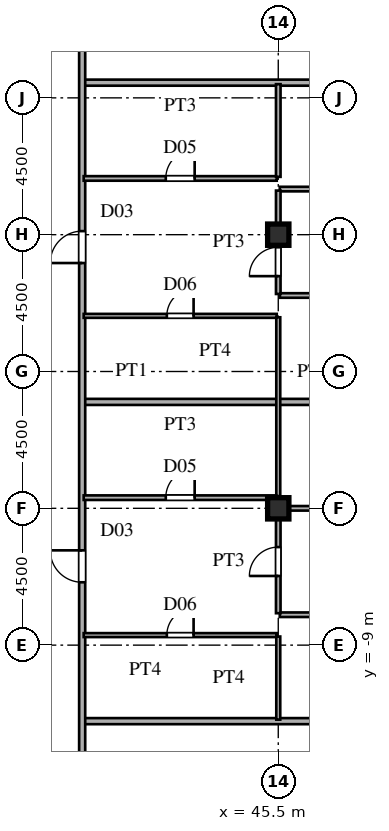
"""IFC4 building model, lengths in metres.
Left out: names, types, materials, properties, quantities, classifications, styles, units other than length and angle.
Written with IfcOpenShell. Run it as: python <this file> out.ifc"""

import sys

from ifc_helpers import new_model, si_unit, direction, frame, frame_2d, origin, origin_2d, place, context, subcontext, project, spatial, rectangle, i_section, extrude, source, transform, mapped, element, fill, save


model = new_model("IFC4")
c1 = context("Model", 3, precision=1e-05, world=origin(), true_north=direction((0.0, 1.0)))
c2 = subcontext(c1, "Body", "Model", "MODEL_VIEW")
j1 = project(units=[si_unit("LENGTHUNIT", "METRE"), si_unit("PLANEANGLEUNIT", "RADIAN")], contexts=[c1])
p1 = place(None, origin())
s1 = spatial("IfcSite", under=j1, at=p1, CompositionType="ELEMENT")
p2 = place(p1, origin())
s2 = spatial("IfcBuilding", under=s1, at=p2, CompositionType="ELEMENT")
p3 = place(p2, frame((0.0, 0.0, 147.6)))
s3 = spatial("IfcBuildingStorey", under=s2, at=p3, CompositionType="ELEMENT", Elevation=147.6)
m1 = source(origin(), c2, "Body", "SweptSolid", [
    extrude(i_section(OverallWidth=0.7, OverallDepth=0.7, WebThickness=0.028, FlangeThickness=0.045, at=origin_2d()), origin(), (0.0, 0.0, 1.0), 3.6),
])
for number, where, z_axis, x_axis in (
    (1, (45.5, -4.5, 0.0), (0.0, 0.0, 1.0), (1.0, 0.0, 0.0)),
    (2, (45.5, 4.5, 0.0), (0.0, 0.0, 1.0), (1.0, 0.0, 0.0)),
):
    element("IfcColumn", number, at=place(p3, frame(where, z_axis=z_axis, x_axis=x_axis)), inside=s3, PredefinedType="COLUMN", context=c2, shape_type="MappedRepresentation", body=[
        mapped(m1, transform((0.0, 0.0, 0.0), scale=1.0)),
    ])
p4 = place(p3, frame((39.13, -11.5, 0.0), z_axis=(0.0, 0.0, 1.0), x_axis=(1.0, 0.0, 0.0)))
e3 = element("IfcWall", 3, at=p4, inside=s3, PredefinedType="PARTITIONING", context=c2, shape_type="SweptSolid", body=[
    extrude(rectangle(XDim=17.714, YDim=0.2, at=frame_2d((8.857, 0.0))), origin(), (0.0, 0.0, 1.0), 3.38),
])
p5 = place(p3, frame((39.1, -8.67, 0.0), z_axis=(0.0, 0.0, 1.0), x_axis=(1.0, 0.0, 0.0)))
e4 = element("IfcWall", 4, at=p5, inside=s3, PredefinedType="PARTITIONING", context=c2, shape_type="SweptSolid", body=[
    extrude(rectangle(XDim=6.35, YDim=0.13, at=frame_2d((3.175, 0.0))), origin(), (0.0, 0.0, 1.0), 3.38),
])
p6 = place(p5, frame((2.735, 0.0, 0.0)))
e5 = element("IfcOpeningElement", 5, at=p6, cuts=e4, PredefinedType="OPENING", context=c2, shape_type="SweptSolid", body=[
    extrude(rectangle(XDim=0.88, YDim=2.1, at=frame_2d((0.44, 1.05))), frame((0.0, 0.075, 0.0), z_axis=(0.0, -1.0, 0.0), x_axis=(1.0, 0.0, 0.0)), (0.0, 0.0, 1.0), 0.15),
])
p7 = place(p3, frame((45.55, -8.0, 0.0), z_axis=(0.0, 0.0, 1.0), x_axis=(1.0, 0.0, 0.0)))
e6 = element("IfcWall", 6, at=p7, inside=s3, PredefinedType="PARTITIONING", context=c2, shape_type="SweptSolid", body=[
    extrude(rectangle(XDim=18.139, YDim=0.15, at=frame_2d((9.069, 0.0))), origin(), (0.0, 0.0, 1.0), 3.38),
])
p8 = place(p7, frame((3.975, 0.0, 0.0)))
e7 = element("IfcOpeningElement", 7, at=p8, cuts=e6, PredefinedType="OPENING", context=c2, shape_type="SweptSolid", body=[
    extrude(rectangle(XDim=0.95, YDim=2.15, at=frame_2d((0.475, 1.075))), frame((0.0, 0.085, 0.0), z_axis=(0.0, -1.0, 0.0), x_axis=(1.0, 0.0, 0.0)), (0.0, 0.0, 1.0), 0.17),
])
p9 = place(p3, frame((45.55, -4.5, 0.0), z_axis=(0.0, 0.0, 1.0), x_axis=(1.0, 0.0, 0.0)))
e8 = element("IfcWall", 8, at=p9, inside=s3, PredefinedType="PARTITIONING", context=c2, shape_type="SweptSolid", body=[
    extrude(rectangle(XDim=23.825, YDim=0.15, at=frame_2d((11.913, 0.0))), origin(), (0.0, 0.0, 1.0), 2.78),
])
p10 = place(p9, frame((3.975, 0.0, 0.0)))
e9 = element("IfcOpeningElement", 9, at=p10, cuts=e8, PredefinedType="OPENING", context=c2, shape_type="SweptSolid", body=[
    extrude(rectangle(XDim=0.95, YDim=2.15, at=frame_2d((0.475, 1.075))), frame((0.0, 0.085, 0.0), z_axis=(0.0, -1.0, 0.0), x_axis=(1.0, 0.0, 0.0)), (0.0, 0.0, 1.0), 0.17),
])
p11 = place(p3, frame((39.1, -4.15, 0.0), z_axis=(0.0, 0.0, 1.0), x_axis=(1.0, 0.0, 0.0)))
e10 = element("IfcWall", 10, at=p11, inside=s3, PredefinedType="PARTITIONING", context=c2, shape_type="SweptSolid", body=[
    extrude(rectangle(XDim=6.35, YDim=0.15, at=frame_2d((3.175, 0.0))), origin(), (0.0, 0.0, 1.0), 3.38),
])
p12 = place(p11, frame((2.7, 0.0, 0.0)))
e11 = element("IfcOpeningElement", 11, at=p12, cuts=e10, PredefinedType="OPENING", context=c2, shape_type="SweptSolid", body=[
    extrude(rectangle(XDim=0.95, YDim=2.15, at=frame_2d((0.475, 1.075))), frame((0.0, 0.085, 0.0), z_axis=(0.0, -1.0, 0.0), x_axis=(1.0, 0.0, 0.0)), (0.0, 0.0, 1.0), 0.17),
])
p13 = place(p3, frame((39.13, -1.0, 0.0), z_axis=(0.0, 0.0, 1.0), x_axis=(1.0, 0.0, 0.0)))
e12 = element("IfcWall", 12, at=p13, inside=s3, PredefinedType="PARTITIONING", context=c2, shape_type="SweptSolid", body=[
    extrude(rectangle(XDim=30.375, YDim=0.2, at=frame_2d((15.188, 0.0))), origin(), (0.0, 0.0, 1.0), 3.38),
])
p14 = place(p3, frame((39.1, 1.83, 0.0), z_axis=(0.0, 0.0, 1.0), x_axis=(1.0, 0.0, 0.0)))
e13 = element("IfcWall", 13, at=p14, inside=s3, PredefinedType="PARTITIONING", context=c2, shape_type="SweptSolid", body=[
    extrude(rectangle(XDim=6.35, YDim=0.13, at=frame_2d((3.175, 0.0))), origin(), (0.0, 0.0, 1.0), 3.38),
])
p15 = place(p14, frame((2.735, 0.0, 0.0)))
e14 = element("IfcOpeningElement", 14, at=p15, cuts=e13, PredefinedType="OPENING", context=c2, shape_type="SweptSolid", body=[
    extrude(rectangle(XDim=0.88, YDim=2.1, at=frame_2d((0.44, 1.05))), frame((0.0, 0.075, 0.0), z_axis=(0.0, -1.0, 0.0), x_axis=(1.0, 0.0, 0.0)), (0.0, 0.0, 1.0), 0.15),
])
p16 = place(p3, frame((45.55, 2.5, 0.0), z_axis=(0.0, 0.0, 1.0), x_axis=(1.0, 0.0, 0.0)))
e15 = element("IfcWall", 15, at=p16, inside=s3, PredefinedType="PARTITIONING", context=c2, shape_type="SweptSolid", body=[
    extrude(rectangle(XDim=23.985, YDim=0.15, at=frame_2d((11.992, 0.0))), origin(), (0.0, 0.0, 1.0), 3.38),
])
p17 = place(p16, frame((3.975, 0.0, 0.0)))
e16 = element("IfcOpeningElement", 16, at=p17, cuts=e15, PredefinedType="OPENING", context=c2, shape_type="SweptSolid", body=[
    extrude(rectangle(XDim=0.95, YDim=2.15, at=frame_2d((0.475, 1.075))), frame((0.0, 0.085, 0.0), z_axis=(0.0, -1.0, 0.0), x_axis=(1.0, 0.0, 0.0)), (0.0, 0.0, 1.0), 0.17),
])
p18 = place(p16, frame((15.975, 0.0, 0.0)))
e17 = element("IfcOpeningElement", 17, at=p18, cuts=e15, PredefinedType="OPENING", context=c2, shape_type="SweptSolid", body=[
    extrude(rectangle(XDim=0.95, YDim=2.15, at=frame_2d((0.475, 1.075))), frame((0.0, 0.085, 0.0), z_axis=(0.0, -1.0, 0.0), x_axis=(1.0, 0.0, 0.0)), (0.0, 0.0, 1.0), 0.17),
])
p19 = place(p3, frame((45.55, 6.0, 0.0), z_axis=(0.0, 0.0, 1.0), x_axis=(1.0, 0.0, 0.0)))
e18 = element("IfcWall", 18, at=p19, inside=s3, PredefinedType="PARTITIONING", context=c2, shape_type="SweptSolid", body=[
    extrude(rectangle(XDim=22.036, YDim=0.15, at=frame_2d((11.018, 0.0))), origin(), (0.0, 0.0, 1.0), 3.38),
])
p20 = place(p19, frame((3.975, 0.0, 0.0)))
e19 = element("IfcOpeningElement", 19, at=p20, cuts=e18, PredefinedType="OPENING", context=c2, shape_type="SweptSolid", body=[
    extrude(rectangle(XDim=0.95, YDim=2.15, at=frame_2d((0.475, 1.075))), frame((0.0, 0.085, 0.0), z_axis=(0.0, -1.0, 0.0), x_axis=(1.0, 0.0, 0.0)), (0.0, 0.0, 1.0), 0.17),
])
p21 = place(p19, frame((15.001, 0.0, 0.0)))
e20 = element("IfcOpeningElement", 20, at=p21, cuts=e18, PredefinedType="OPENING", context=c2, shape_type="SweptSolid", body=[
    extrude(rectangle(XDim=0.95, YDim=2.15, at=frame_2d((0.475, 1.075))), frame((0.0, 0.085, 0.0), z_axis=(0.0, -1.0, 0.0), x_axis=(1.0, 0.0, 0.0)), (0.0, 0.0, 1.0), 0.17),
])
p22 = place(p3, frame((39.1, 6.35, 0.0), z_axis=(0.0, 0.0, 1.0), x_axis=(1.0, 0.0, 0.0)))
e21 = element("IfcWall", 21, at=p22, inside=s3, PredefinedType="PARTITIONING", context=c2, shape_type="SweptSolid", body=[
    extrude(rectangle(XDim=6.35, YDim=0.15, at=frame_2d((3.175, 0.0))), origin(), (0.0, 0.0, 1.0), 3.38),
])
p23 = place(p22, frame((2.7, 0.0, 0.0)))
e22 = element("IfcOpeningElement", 22, at=p23, cuts=e21, PredefinedType="OPENING", context=c2, shape_type="SweptSolid", body=[
    extrude(rectangle(XDim=0.95, YDim=2.15, at=frame_2d((0.475, 1.075))), frame((0.0, 0.085, 0.0), z_axis=(0.0, -1.0, 0.0), x_axis=(1.0, 0.0, 0.0)), (0.0, 0.0, 1.0), 0.17),
])
p24 = place(p3, frame((39.13, 9.5, 0.0), z_axis=(0.0, 0.0, 1.0), x_axis=(1.0, 0.0, 0.0)))
e23 = element("IfcWall", 23, at=p24, inside=s3, PredefinedType="PARTITIONING", context=c2, shape_type="SweptSolid", body=[
    extrude(rectangle(XDim=21.612, YDim=0.2, at=frame_2d((10.806, 0.0))), origin(), (0.0, 0.0, 1.0), 3.38),
])
p25 = place(p3, frame((39.05, -15.715, 0.0), z_axis=(0.0, 0.0, 1.0), x_axis=(0.0, 1.0, 0.0)))
e24 = element("IfcWall", 24, at=p25, inside=s3, PredefinedType="PARTITIONING", context=c2, shape_type="SweptSolid", body=[
    extrude(rectangle(XDim=31.43, YDim=0.2, at=frame_2d((15.715, 0.0))), origin(), (0.0, 0.0, 1.0), 3.38),
])
p26 = place(p25, frame((1.54, 0.0, 0.0)))
e25 = element("IfcOpeningElement", 25, at=p26, cuts=e24, PredefinedType="OPENING", context=c2, shape_type="SweptSolid", body=[
    extrude(rectangle(XDim=1.05, YDim=2.25, at=frame_2d((0.525, 1.125))), frame((0.0, 0.11, 0.0), z_axis=(0.0, -1.0, 0.0), x_axis=(1.0, 0.0, 0.0)), (0.0, 0.0, 1.0), 0.22),
])
p27 = place(p25, frame((8.782, 0.0, 0.0)))
e26 = element("IfcOpeningElement", 26, at=p27, cuts=e24, PredefinedType="OPENING", context=c2, shape_type="SweptSolid", body=[
    extrude(rectangle(XDim=1.05, YDim=2.25, at=frame_2d((0.525, 1.125))), frame((0.0, 0.11, 0.0), z_axis=(0.0, -1.0, 0.0), x_axis=(1.0, 0.0, 0.0)), (0.0, 0.0, 1.0), 0.22),
])
p28 = place(p25, frame((19.282, 0.0, 0.0)))
e27 = element("IfcOpeningElement", 27, at=p28, cuts=e24, PredefinedType="OPENING", context=c2, shape_type="SweptSolid", body=[
    extrude(rectangle(XDim=1.05, YDim=2.25, at=frame_2d((0.525, 1.125))), frame((0.0, 0.11, 0.0), z_axis=(0.0, -1.0, 0.0), x_axis=(1.0, 0.0, 0.0)), (0.0, 0.0, 1.0), 0.22),
])
p29 = place(p25, frame((27.84, 0.0, 0.0)))
e28 = element("IfcOpeningElement", 28, at=p29, cuts=e24, PredefinedType="OPENING", context=c2, shape_type="SweptSolid", body=[
    extrude(rectangle(XDim=1.05, YDim=2.25, at=frame_2d((0.525, 1.125))), frame((0.0, 0.11, 0.0), z_axis=(0.0, -1.0, 0.0), x_axis=(1.0, 0.0, 0.0)), (0.0, 0.0, 1.0), 0.22),
])
p30 = place(p3, frame((45.5, -11.45, 0.0), z_axis=(0.0, 0.0, 1.0), x_axis=(0.0, 1.0, 0.0)))
e29 = element("IfcWall", 29, at=p30, inside=s3, PredefinedType="PARTITIONING", context=c2, shape_type="SweptSolid", body=[
    extrude(rectangle(XDim=2.733, YDim=0.13, at=frame_2d((1.366, 0.0))), origin(), (0.0, 0.0, 1.0), 2.78),
])
p31 = place(p3, frame((45.5, -7.95, 0.0), z_axis=(0.0, 0.0, 1.0), x_axis=(0.0, 1.0, 0.0)))
e30 = element("IfcWall", 30, at=p31, inside=s3, PredefinedType="PARTITIONING", context=c2, shape_type="SweptSolid", body=[
    extrude(rectangle(XDim=3.4, YDim=0.15, at=frame_2d((1.7, 0.0))), origin(), (0.0, 0.0, 1.0), 2.78),
])
p32 = place(p31, frame((1.225, 0.0, 0.0)))
e31 = element("IfcOpeningElement", 31, at=p32, cuts=e30, PredefinedType="OPENING", context=c2, shape_type="SweptSolid", body=[
    extrude(rectangle(XDim=0.95, YDim=2.15, at=frame_2d((0.475, 1.075))), frame((0.0, 0.085, 0.0), z_axis=(0.0, -1.0, 0.0), x_axis=(1.0, 0.0, 0.0)), (0.0, 0.0, 1.0), 0.17),
])
p33 = place(p3, frame((45.5, -4.098, 0.0), z_axis=(0.0, 0.0, 1.0), x_axis=(0.0, 1.0, 0.0)))
e32 = element("IfcWall", 32, at=p33, inside=s3, PredefinedType="PARTITIONING", context=c2, shape_type="SweptSolid", body=[
    extrude(rectangle(XDim=5.881, YDim=0.13, at=frame_2d((2.94, 0.0))), origin(), (0.0, 0.0, 1.0), 2.78),
])
p34 = place(p3, frame((45.5, 2.55, 0.0), z_axis=(0.0, 0.0, 1.0), x_axis=(0.0, 1.0, 0.0)))
e33 = element("IfcWall", 33, at=p34, inside=s3, PredefinedType="PARTITIONING", context=c2, shape_type="SweptSolid", body=[
    extrude(rectangle(XDim=3.4, YDim=0.15, at=frame_2d((1.7, 0.0))), origin(), (0.0, 0.0, 1.0), 2.78),
])
p35 = place(p34, frame((0.586, 0.0, 0.0)))
e34 = element("IfcOpeningElement", 34, at=p35, cuts=e33, PredefinedType="OPENING", context=c2, shape_type="SweptSolid", body=[
    extrude(rectangle(XDim=0.95, YDim=2.15, at=frame_2d((0.475, 1.075))), frame((0.0, 0.085, 0.0), z_axis=(0.0, -1.0, 0.0), x_axis=(1.0, 0.0, 0.0)), (0.0, 0.0, 1.0), 0.17),
])
p36 = place(p3, frame((45.5, 6.402, 0.0), z_axis=(0.0, 0.0, 1.0), x_axis=(0.0, 1.0, 0.0)))
e35 = element("IfcWall", 35, at=p36, inside=s3, PredefinedType="PARTITIONING", context=c2, shape_type="SweptSolid", body=[
    extrude(rectangle(XDim=3.048, YDim=0.15, at=frame_2d((1.524, 0.0))), origin(), (0.0, 0.0, 1.0), 2.78),
])
m2 = source(origin(), c2, "Body", "SweptSolid", [
    extrude(rectangle(XDim=0.88, YDim=2.1, at=frame_2d((0.44, 1.05))), frame((0.0, 0.025, 0.0), z_axis=(0.0, -1.0, 0.0), x_axis=(1.0, 0.0, 0.0)), (0.0, 0.0, 1.0), 0.05),
])
p37 = place(p6, origin())
e36 = element("IfcDoor", 36, at=p37, inside=s3, OperationType="SINGLE_SWING_RIGHT", PredefinedType="DOOR", context=c2, shape_type="MappedRepresentation", body=[
    mapped(m2, transform((0.0, 0.0, 0.0), scale=1.0)),
])
fill(e5, e36)
m3 = source(origin(), c2, "Body", "SweptSolid", [
    extrude(rectangle(XDim=0.95, YDim=2.15, at=frame_2d((0.475, 1.075))), frame((0.0, 0.025, 0.0), z_axis=(0.0, -1.0, 0.0), x_axis=(1.0, 0.0, 0.0)), (0.0, 0.0, 1.0), 0.05),
])
p38 = place(p12, origin())
e37 = element("IfcDoor", 37, at=p38, inside=s3, OperationType="SINGLE_SWING_RIGHT", PredefinedType="DOOR", context=c2, shape_type="MappedRepresentation", body=[
    mapped(m3, transform((0.0, 0.0, 0.0), scale=1.0)),
])
fill(e11, e37)
p39 = place(p15, origin())
e38 = element("IfcDoor", 38, at=p39, inside=s3, OperationType="SINGLE_SWING_RIGHT", PredefinedType="DOOR", context=c2, shape_type="MappedRepresentation", body=[
    mapped(m2, transform((0.0, 0.0, 0.0), scale=1.0)),
])
fill(e14, e38)
p40 = place(p23, origin())
e39 = element("IfcDoor", 39, at=p40, inside=s3, OperationType="SINGLE_SWING_RIGHT", PredefinedType="DOOR", context=c2, shape_type="MappedRepresentation", body=[
    mapped(m3, transform((0.0, 0.0, 0.0), scale=1.0)),
])
fill(e22, e39)
m4 = source(origin(), c2, "Body", "SweptSolid", [
    extrude(rectangle(XDim=1.05, YDim=2.25, at=frame_2d((0.525, 1.125))), frame((0.0, 0.025, 0.0), z_axis=(0.0, -1.0, 0.0), x_axis=(1.0, 0.0, 0.0)), (0.0, 0.0, 1.0), 0.05),
])
p41 = place(p27, origin())
e40 = element("IfcDoor", 40, at=p41, inside=s3, OperationType="SINGLE_SWING_RIGHT", PredefinedType="DOOR", context=c2, shape_type="MappedRepresentation", body=[
    mapped(m4, transform((0.0, 0.0, 0.0), scale=1.0)),
])
fill(e26, e40)
p42 = place(p28, origin())
e41 = element("IfcDoor", 41, at=p42, inside=s3, OperationType="SINGLE_SWING_LEFT", PredefinedType="DOOR", context=c2, shape_type="MappedRepresentation", body=[
    mapped(m4, transform((0.0, 0.0, 0.0), scale=1.0)),
])
fill(e27, e41)
p43 = place(p32, origin())
e42 = element("IfcDoor", 42, at=p43, inside=s3, OperationType="SINGLE_SWING_LEFT", PredefinedType="DOOR", context=c2, shape_type="MappedRepresentation", body=[
    mapped(m3, transform((0.0, 0.0, 0.0), scale=1.0)),
])
fill(e31, e42)
p44 = place(p35, origin())
e43 = element("IfcDoor", 43, at=p44, inside=s3, OperationType="SINGLE_SWING_LEFT", PredefinedType="DOOR", context=c2, shape_type="MappedRepresentation", body=[
    mapped(m3, transform((0.0, 0.0, 0.0), scale=1.0)),
])
fill(e34, e43)
save(model, sys.argv[1])
